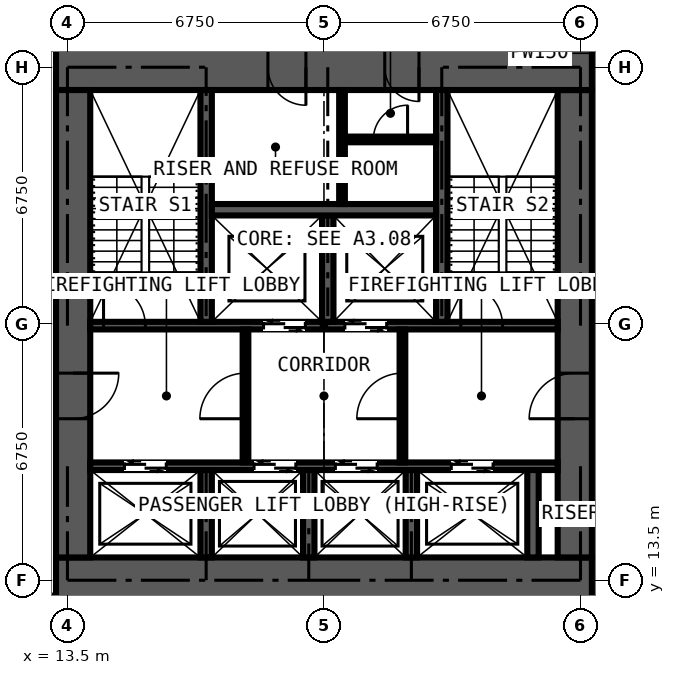
"""IFC4 building model, lengths in metres.
Left out: names, types, materials, properties, quantities, classifications, styles, units other than length and angle.
Written with IfcOpenShell. Run it as: python <this file> out.ifc"""

import sys

from ifc_helpers import new_model, si_unit, direction, frame, frame_2d, origin, place, context, subcontext, project, spatial, rectangle, extrude, element, fill, save


model = new_model("IFC4")
c1 = context("Model", 3, precision=1e-05, world=origin(), true_north=direction((0.0, 1.0)))
c2 = subcontext(c1, "Body", "Model", "MODEL_VIEW")
j1 = project(units=[si_unit("LENGTHUNIT", "METRE"), si_unit("PLANEANGLEUNIT", "RADIAN")], contexts=[c1])
p1 = place(None, origin())
s1 = spatial("IfcSite", under=j1, at=p1, CompositionType="ELEMENT")
p2 = place(p1, origin())
s2 = spatial("IfcBuilding", under=s1, at=p2, CompositionType="ELEMENT")
p3 = place(p2, frame((0.0, 0.0, 243.9)))
s3 = spatial("IfcBuildingStorey", under=s2, at=p3, CompositionType="ELEMENT", Elevation=243.9)
p4 = place(p3, frame((13.2, 13.5, 0.0), z_axis=(0.0, 0.0, 1.0), x_axis=(1.0, 0.0, 0.0)))
e1 = element("IfcWall", 1, at=p4, inside=s3, PredefinedType="SHEAR", context=c2, shape_type="SweptSolid", body=[
    extrude(rectangle(XDim=14.1, YDim=1.2, at=frame_2d((7.05, 0.0))), origin(), (0.0, 0.0, 1.0), 3.6),
])
p5 = place(p3, frame((26.85, 14.1, 0.0), z_axis=(0.0, 0.0, 1.0), x_axis=(0.0, 1.0, 0.0)))
e2 = element("IfcWall", 2, at=p5, inside=s3, PredefinedType="SHEAR", context=c2, shape_type="SweptSolid", body=[
    extrude(rectangle(XDim=12.3, YDim=0.9, at=frame_2d((6.15, 0.0))), origin(), (0.0, 0.0, 1.0), 3.6),
])
p6 = place(p5, frame((3.65, 0.0, 0.0)))
e3 = element("IfcOpeningElement", 3, at=p6, cuts=e2, PredefinedType="OPENING", context=c2, shape_type="SweptSolid", body=[
    extrude(rectangle(XDim=1.2, YDim=2.2, at=frame_2d((0.6, 1.1))), frame((0.0, 0.46, 0.0), z_axis=(0.0, -1.0, 0.0), x_axis=(1.0, 0.0, 0.0)), (0.0, 0.0, 1.0), 0.92),
])
p7 = place(p3, frame((27.3, 27.0, 0.0), z_axis=(0.0, 0.0, 1.0), x_axis=(-1.0, 0.0, 0.0)))
e4 = element("IfcWall", 4, at=p7, inside=s3, PredefinedType="SHEAR", context=c2, shape_type="SweptSolid", body=[
    extrude(rectangle(XDim=14.1, YDim=1.2, at=frame_2d((7.05, 0.0))), origin(), (0.0, 0.0, 1.0), 3.6),
])
p8 = place(p7, frame((4.55, 0.0, 0.0)))
e5 = element("IfcOpeningElement", 5, at=p8, cuts=e4, PredefinedType="OPENING", context=c2, shape_type="SweptSolid", body=[
    extrude(rectangle(XDim=0.9, YDim=2.2, at=frame_2d((0.45, 1.1))), frame((0.0, 0.61, 0.0), z_axis=(0.0, -1.0, 0.0), x_axis=(1.0, 0.0, 0.0)), (0.0, 0.0, 1.0), 1.22),
])
p9 = place(p7, frame((7.525, 0.0, 0.0)))
e6 = element("IfcOpeningElement", 6, at=p9, cuts=e4, PredefinedType="OPENING", context=c2, shape_type="SweptSolid", body=[
    extrude(rectangle(XDim=1.0, YDim=2.2, at=frame_2d((0.5, 1.1))), frame((0.0, 0.61, 0.0), z_axis=(0.0, -1.0, 0.0), x_axis=(1.0, 0.0, 0.0)), (0.0, 0.0, 1.0), 1.22),
])
p10 = place(p3, frame((13.65, 26.4, 0.0), z_axis=(0.0, 0.0, 1.0), x_axis=(0.0, -1.0, 0.0)))
e7 = element("IfcWall", 7, at=p10, inside=s3, PredefinedType="SHEAR", context=c2, shape_type="SweptSolid", body=[
    extrude(rectangle(XDim=12.3, YDim=0.9, at=frame_2d((6.15, 0.0))), origin(), (0.0, 0.0, 1.0), 3.6),
])
p11 = place(p10, frame((7.45, 0.0, 0.0)))
e8 = element("IfcOpeningElement", 8, at=p11, cuts=e7, PredefinedType="OPENING", context=c2, shape_type="SweptSolid", body=[
    extrude(rectangle(XDim=1.2, YDim=2.2, at=frame_2d((0.6, 1.1))), frame((0.0, 0.46, 0.0), z_axis=(0.0, -1.0, 0.0), x_axis=(1.0, 0.0, 0.0)), (0.0, 0.0, 1.0), 0.92),
])
p12 = place(p3, frame((14.1, 16.5, 0.0), z_axis=(0.0, 0.0, 1.0), x_axis=(1.0, 0.0, 0.0)))
e9 = element("IfcWall", 9, at=p12, inside=s3, PredefinedType="SHEAR", context=c2, shape_type="SweptSolid", body=[
    extrude(rectangle(XDim=12.3, YDim=0.2, at=frame_2d((6.15, 0.0))), origin(), (0.0, 0.0, 1.0), 3.6),
])
p13 = place(p12, frame((0.9, 0.0, 0.0)))
e10 = element("IfcOpeningElement", 10, at=p13, cuts=e9, PredefinedType="OPENING", context=c2, shape_type="SweptSolid", body=[
    extrude(rectangle(XDim=1.1, YDim=2.2, at=frame_2d((0.55, 1.1))), frame((0.0, 0.11, 0.0), z_axis=(0.0, -1.0, 0.0), x_axis=(1.0, 0.0, 0.0)), (0.0, 0.0, 1.0), 0.22),
])
p14 = place(p12, frame((4.31, 0.0, 0.0)))
e11 = element("IfcOpeningElement", 11, at=p14, cuts=e9, PredefinedType="OPENING", context=c2, shape_type="SweptSolid", body=[
    extrude(rectangle(XDim=1.1, YDim=2.2, at=frame_2d((0.55, 1.1))), frame((0.0, 0.11, 0.0), z_axis=(0.0, -1.0, 0.0), x_axis=(1.0, 0.0, 0.0)), (0.0, 0.0, 1.0), 0.22),
])
p15 = place(p12, frame((6.45, 0.0, 0.0)))
e12 = element("IfcOpeningElement", 12, at=p15, cuts=e9, PredefinedType="OPENING", context=c2, shape_type="SweptSolid", body=[
    extrude(rectangle(XDim=1.1, YDim=2.2, at=frame_2d((0.55, 1.1))), frame((0.0, 0.11, 0.0), z_axis=(0.0, -1.0, 0.0), x_axis=(1.0, 0.0, 0.0)), (0.0, 0.0, 1.0), 0.22),
])
p16 = place(p12, frame((9.5, 0.0, 0.0)))
e13 = element("IfcOpeningElement", 13, at=p16, cuts=e9, PredefinedType="OPENING", context=c2, shape_type="SweptSolid", body=[
    extrude(rectangle(XDim=1.1, YDim=2.2, at=frame_2d((0.55, 1.1))), frame((0.0, 0.11, 0.0), z_axis=(0.0, -1.0, 0.0), x_axis=(1.0, 0.0, 0.0)), (0.0, 0.0, 1.0), 0.22),
])
p17 = place(p3, frame((14.1, 20.2, 0.0), z_axis=(0.0, 0.0, 1.0), x_axis=(1.0, 0.0, 0.0)))
e14 = element("IfcWall", 14, at=p17, inside=s3, PredefinedType="SHEAR", context=c2, shape_type="SweptSolid", body=[
    extrude(rectangle(XDim=12.3, YDim=0.2, at=frame_2d((6.15, 0.0))), origin(), (0.0, 0.0, 1.0), 3.6),
])
p18 = place(p17, frame((4.56, 0.0, 0.0)))
e15 = element("IfcOpeningElement", 15, at=p18, cuts=e14, PredefinedType="OPENING", context=c2, shape_type="SweptSolid", body=[
    extrude(rectangle(XDim=1.1, YDim=2.2, at=frame_2d((0.55, 1.1))), frame((0.0, 0.11, 0.0), z_axis=(0.0, -1.0, 0.0), x_axis=(1.0, 0.0, 0.0)), (0.0, 0.0, 1.0), 0.22),
])
p19 = place(p17, frame((6.7, 0.0, 0.0)))
e16 = element("IfcOpeningElement", 16, at=p19, cuts=e14, PredefinedType="OPENING", context=c2, shape_type="SweptSolid", body=[
    extrude(rectangle(XDim=1.1, YDim=2.2, at=frame_2d((0.55, 1.1))), frame((0.0, 0.11, 0.0), z_axis=(0.0, -1.0, 0.0), x_axis=(1.0, 0.0, 0.0)), (0.0, 0.0, 1.0), 0.22),
])
p20 = place(p17, frame((0.35, 0.0, 0.0)))
e17 = element("IfcOpeningElement", 17, at=p20, cuts=e14, PredefinedType="OPENING", context=c2, shape_type="SweptSolid", body=[
    extrude(rectangle(XDim=1.1, YDim=2.2, at=frame_2d((0.55, 1.1))), frame((0.0, 0.11, 0.0), z_axis=(0.0, -1.0, 0.0), x_axis=(1.0, 0.0, 0.0)), (0.0, 0.0, 1.0), 0.22),
])
p21 = place(p17, frame((9.75, 0.0, 0.0)))
e18 = element("IfcOpeningElement", 18, at=p21, cuts=e14, PredefinedType="OPENING", context=c2, shape_type="SweptSolid", body=[
    extrude(rectangle(XDim=1.1, YDim=2.2, at=frame_2d((0.55, 1.1))), frame((0.0, 0.11, 0.0), z_axis=(0.0, -1.0, 0.0), x_axis=(1.0, 0.0, 0.0)), (0.0, 0.0, 1.0), 0.22),
])
for number, where, z_axis, x_axis in (
    (19, (17.15, 20.3, 0.0), (0.0, 0.0, 1.0), (0.0, 1.0, 0.0)),
    (20, (23.35, 20.3, 0.0), (0.0, 0.0, 1.0), (0.0, 1.0, 0.0)),
):
    element("IfcWall", number, at=place(p3, frame(where, z_axis=z_axis, x_axis=x_axis)), inside=s3, PredefinedType="SHEAR", context=c2, shape_type="SweptSolid", body=[
        extrude(rectangle(XDim=6.1, YDim=0.3, at=frame_2d((3.05, 0.0))), origin(), (0.0, 0.0, 1.0), 3.6),
    ])
p22 = place(p3, frame((20.35, 20.3, 0.0), z_axis=(0.0, 0.0, 1.0), x_axis=(0.0, 1.0, 0.0)))
e21 = element("IfcWall", 21, at=p22, inside=s3, PredefinedType="SHEAR", context=c2, shape_type="SweptSolid", body=[
    extrude(rectangle(XDim=2.8, YDim=0.3, at=frame_2d((1.4, 0.0))), origin(), (0.0, 0.0, 1.0), 3.6),
])
p23 = place(p3, frame((17.3, 23.25, 0.0), z_axis=(0.0, 0.0, 1.0), x_axis=(1.0, 0.0, 0.0)))
e22 = element("IfcWall", 22, at=p23, inside=s3, PredefinedType="SHEAR", context=c2, shape_type="SweptSolid", body=[
    extrude(rectangle(XDim=5.9, YDim=0.3, at=frame_2d((2.95, 0.0))), origin(), (0.0, 0.0, 1.0), 3.6),
])
for number, where, z_axis, x_axis in (
    (23, (17.15, 14.1, 0.0), (0.0, 0.0, 1.0), (0.0, 1.0, 0.0)),
    (24, (19.85, 14.1, 0.0), (0.0, 0.0, 1.0), (0.0, 1.0, 0.0)),
    (25, (22.55, 14.1, 0.0), (0.0, 0.0, 1.0), (0.0, 1.0, 0.0)),
    (26, (25.75, 14.1, 0.0), (0.0, 0.0, 1.0), (0.0, 1.0, 0.0)),
):
    element("IfcWall", number, at=place(p3, frame(where, z_axis=z_axis, x_axis=x_axis)), inside=s3, PredefinedType="SHEAR", context=c2, shape_type="SweptSolid", body=[
        extrude(rectangle(XDim=2.3, YDim=0.3, at=frame_2d((1.15, 0.0))), origin(), (0.0, 0.0, 1.0), 3.6),
    ])
p24 = place(p3, frame((18.185, 16.6, 0.0), z_axis=(0.0, 0.0, 1.0), x_axis=(0.0, 1.0, 0.0)))
e27 = element("IfcWall", 27, at=p24, inside=s3, PredefinedType="PARTITIONING", context=c2, shape_type="SweptSolid", body=[
    extrude(rectangle(XDim=3.5, YDim=0.15, at=frame_2d((1.75, 0.0))), origin(), (0.0, 0.0, 1.0), 3.375),
])
p25 = place(p24, frame((1.15, 0.0, 0.0)))
e28 = element("IfcOpeningElement", 28, at=p25, cuts=e27, PredefinedType="OPENING", context=c2, shape_type="SweptSolid", body=[
    extrude(rectangle(XDim=1.2, YDim=2.2, at=frame_2d((0.6, 1.1))), frame((0.0, 0.085, 0.0), z_axis=(0.0, -1.0, 0.0), x_axis=(1.0, 0.0, 0.0)), (0.0, 0.0, 1.0), 0.17),
])
p26 = place(p3, frame((22.315, 16.6, 0.0), z_axis=(0.0, 0.0, 1.0), x_axis=(0.0, 1.0, 0.0)))
e29 = element("IfcWall", 29, at=p26, inside=s3, PredefinedType="PARTITIONING", context=c2, shape_type="SweptSolid", body=[
    extrude(rectangle(XDim=3.5, YDim=0.15, at=frame_2d((1.75, 0.0))), origin(), (0.0, 0.0, 1.0), 3.375),
])
p27 = place(p26, frame((1.15, 0.0, 0.0)))
e30 = element("IfcOpeningElement", 30, at=p27, cuts=e29, PredefinedType="OPENING", context=c2, shape_type="SweptSolid", body=[
    extrude(rectangle(XDim=1.2, YDim=2.2, at=frame_2d((0.6, 1.1))), frame((0.0, 0.085, 0.0), z_axis=(0.0, -1.0, 0.0), x_axis=(1.0, 0.0, 0.0)), (0.0, 0.0, 1.0), 0.17),
])
p28 = place(p3, frame((20.725, 23.4, 0.0), z_axis=(0.0, 0.0, 1.0), x_axis=(0.0, 1.0, 0.0)))
e31 = element("IfcWall", 31, at=p28, inside=s3, PredefinedType="PARTITIONING", context=c2, shape_type="SweptSolid", body=[
    extrude(rectangle(XDim=3.0, YDim=0.15, at=frame_2d((1.5, 0.0))), origin(), (0.0, 0.0, 1.0), 3.375),
])
p29 = place(p3, frame((20.8, 25.1, 0.0), z_axis=(0.0, 0.0, 1.0), x_axis=(1.0, 0.0, 0.0)))
e32 = element("IfcWall", 32, at=p29, inside=s3, PredefinedType="PARTITIONING", context=c2, shape_type="SweptSolid", body=[
    extrude(rectangle(XDim=2.4, YDim=0.15, at=frame_2d((1.2, 0.0))), origin(), (0.0, 0.0, 1.0), 3.375),
])
p30 = place(p29, frame((0.75, 0.0, 0.0)))
e33 = element("IfcOpeningElement", 33, at=p30, cuts=e32, PredefinedType="OPENING", context=c2, shape_type="SweptSolid", body=[
    extrude(rectangle(XDim=0.9, YDim=2.2, at=frame_2d((0.45, 1.1))), frame((0.0, 0.085, 0.0), z_axis=(0.0, -1.0, 0.0), x_axis=(1.0, 0.0, 0.0)), (0.0, 0.0, 1.0), 0.17),
])
p31 = place(p13, origin())
e34 = element("IfcDoor", 34, at=p31, inside=s3, OperationType="DOUBLE_DOOR_SLIDING", PredefinedType="DOOR", context=c2, shape_type="SweptSolid", body=[
    extrude(rectangle(XDim=1.1, YDim=2.2, at=frame_2d((0.55, 1.1))), frame((0.0, 0.025, 0.0), z_axis=(0.0, -1.0, 0.0), x_axis=(1.0, 0.0, 0.0)), (0.0, 0.0, 1.0), 0.05),
])
fill(e10, e34)
p32 = place(p14, origin())
e35 = element("IfcDoor", 35, at=p32, inside=s3, OperationType="DOUBLE_DOOR_SLIDING", PredefinedType="DOOR", context=c2, shape_type="SweptSolid", body=[
    extrude(rectangle(XDim=1.1, YDim=2.2, at=frame_2d((0.55, 1.1))), frame((0.0, 0.025, 0.0), z_axis=(0.0, -1.0, 0.0), x_axis=(1.0, 0.0, 0.0)), (0.0, 0.0, 1.0), 0.05),
])
fill(e11, e35)
p33 = place(p15, origin())
e36 = element("IfcDoor", 36, at=p33, inside=s3, OperationType="DOUBLE_DOOR_SLIDING", PredefinedType="DOOR", context=c2, shape_type="SweptSolid", body=[
    extrude(rectangle(XDim=1.1, YDim=2.2, at=frame_2d((0.55, 1.1))), frame((0.0, 0.025, 0.0), z_axis=(0.0, -1.0, 0.0), x_axis=(1.0, 0.0, 0.0)), (0.0, 0.0, 1.0), 0.05),
])
fill(e12, e36)
p34 = place(p16, origin())
e37 = element("IfcDoor", 37, at=p34, inside=s3, OperationType="DOUBLE_DOOR_SLIDING", PredefinedType="DOOR", context=c2, shape_type="SweptSolid", body=[
    extrude(rectangle(XDim=1.1, YDim=2.2, at=frame_2d((0.55, 1.1))), frame((0.0, 0.025, 0.0), z_axis=(0.0, -1.0, 0.0), x_axis=(1.0, 0.0, 0.0)), (0.0, 0.0, 1.0), 0.05),
])
fill(e13, e37)
p35 = place(p18, origin())
e38 = element("IfcDoor", 38, at=p35, inside=s3, OperationType="DOUBLE_DOOR_SLIDING", PredefinedType="DOOR", context=c2, shape_type="SweptSolid", body=[
    extrude(rectangle(XDim=1.1, YDim=2.2, at=frame_2d((0.55, 1.1))), frame((0.0, 0.025, 0.0), z_axis=(0.0, -1.0, 0.0), x_axis=(1.0, 0.0, 0.0)), (0.0, 0.0, 1.0), 0.05),
])
fill(e15, e38)
p36 = place(p19, origin())
e39 = element("IfcDoor", 39, at=p36, inside=s3, OperationType="DOUBLE_DOOR_SLIDING", PredefinedType="DOOR", context=c2, shape_type="SweptSolid", body=[
    extrude(rectangle(XDim=1.1, YDim=2.2, at=frame_2d((0.55, 1.1))), frame((0.0, 0.025, 0.0), z_axis=(0.0, -1.0, 0.0), x_axis=(1.0, 0.0, 0.0)), (0.0, 0.0, 1.0), 0.05),
])
fill(e16, e39)
p37 = place(p11, origin())
e40 = element("IfcDoor", 40, at=p37, inside=s3, OperationType="DOUBLE_DOOR_SINGLE_SWING", PredefinedType="DOOR", context=c2, shape_type="SweptSolid", body=[
    extrude(rectangle(XDim=1.2, YDim=2.2, at=frame_2d((0.6, 1.1))), frame((0.0, 0.025, 0.0), z_axis=(0.0, -1.0, 0.0), x_axis=(1.0, 0.0, 0.0)), (0.0, 0.0, 1.0), 0.05),
])
fill(e8, e40)
p38 = place(p6, origin())
e41 = element("IfcDoor", 41, at=p38, inside=s3, OperationType="DOUBLE_DOOR_SINGLE_SWING", PredefinedType="DOOR", context=c2, shape_type="SweptSolid", body=[
    extrude(rectangle(XDim=1.2, YDim=2.2, at=frame_2d((0.6, 1.1))), frame((0.0, 0.025, 0.0), z_axis=(0.0, -1.0, 0.0), x_axis=(1.0, 0.0, 0.0)), (0.0, 0.0, 1.0), 0.05),
])
fill(e3, e41)
p39 = place(p25, origin())
e42 = element("IfcDoor", 42, at=p39, inside=s3, OperationType="DOUBLE_DOOR_SINGLE_SWING", PredefinedType="DOOR", context=c2, shape_type="SweptSolid", body=[
    extrude(rectangle(XDim=1.2, YDim=2.2, at=frame_2d((0.6, 1.1))), frame((0.0, 0.025, 0.0), z_axis=(0.0, -1.0, 0.0), x_axis=(1.0, 0.0, 0.0)), (0.0, 0.0, 1.0), 0.05),
])
fill(e28, e42)
p40 = place(p27, origin())
e43 = element("IfcDoor", 43, at=p40, inside=s3, OperationType="DOUBLE_DOOR_SINGLE_SWING", PredefinedType="DOOR", context=c2, shape_type="SweptSolid", body=[
    extrude(rectangle(XDim=1.2, YDim=2.2, at=frame_2d((0.6, 1.1))), frame((0.0, 0.025, 0.0), z_axis=(0.0, -1.0, 0.0), x_axis=(1.0, 0.0, 0.0)), (0.0, 0.0, 1.0), 0.05),
])
fill(e30, e43)
p41 = place(p30, origin())
e44 = element("IfcDoor", 44, at=p41, inside=s3, OperationType="SINGLE_SWING_RIGHT", PredefinedType="DOOR", context=c2, shape_type="SweptSolid", body=[
    extrude(rectangle(XDim=0.9, YDim=2.2, at=frame_2d((0.45, 1.1))), frame((0.0, 0.025, 0.0), z_axis=(0.0, -1.0, 0.0), x_axis=(1.0, 0.0, 0.0)), (0.0, 0.0, 1.0), 0.05),
])
fill(e33, e44)
p42 = place(p8, origin())
e45 = element("IfcDoor", 45, at=p42, inside=s3, OperationType="SINGLE_SWING_LEFT", PredefinedType="DOOR", context=c2, shape_type="SweptSolid", body=[
    extrude(rectangle(XDim=0.9, YDim=2.2, at=frame_2d((0.45, 1.1))), frame((0.0, 0.4, 0.0), z_axis=(0.0, -1.0, 0.0), x_axis=(1.0, 0.0, 0.0)), (0.0, 0.0, 1.0), 0.8),
])
fill(e5, e45)
p43 = place(p9, origin())
e46 = element("IfcDoor", 46, at=p43, inside=s3, OperationType="SINGLE_SWING_LEFT", PredefinedType="DOOR", context=c2, shape_type="SweptSolid", body=[
    extrude(rectangle(XDim=1.0, YDim=2.2, at=frame_2d((0.5, 1.1))), frame((0.0, 0.025, 0.0), z_axis=(0.0, -1.0, 0.0), x_axis=(1.0, 0.0, 0.0)), (0.0, 0.0, 1.0), 0.05),
])
fill(e6, e46)
p44 = place(p20, origin())
e47 = element("IfcDoor", 47, at=p44, inside=s3, OperationType="SINGLE_SWING_LEFT", PredefinedType="DOOR", context=c2, shape_type="SweptSolid", body=[
    extrude(rectangle(XDim=1.1, YDim=2.2, at=frame_2d((0.55, 1.1))), frame((0.0, 0.025, 0.0), z_axis=(0.0, -1.0, 0.0), x_axis=(1.0, 0.0, 0.0)), (0.0, 0.0, 1.0), 0.05),
])
fill(e17, e47)
p45 = place(p21, origin())
e48 = element("IfcDoor", 48, at=p45, inside=s3, OperationType="SINGLE_SWING_LEFT", PredefinedType="DOOR", context=c2, shape_type="SweptSolid", body=[
    extrude(rectangle(XDim=1.1, YDim=2.2, at=frame_2d((0.55, 1.1))), frame((0.0, 0.025, 0.0), z_axis=(0.0, -1.0, 0.0), x_axis=(1.0, 0.0, 0.0)), (0.0, 0.0, 1.0), 0.05),
])
fill(e18, e48)
save(model, sys.argv[1])
